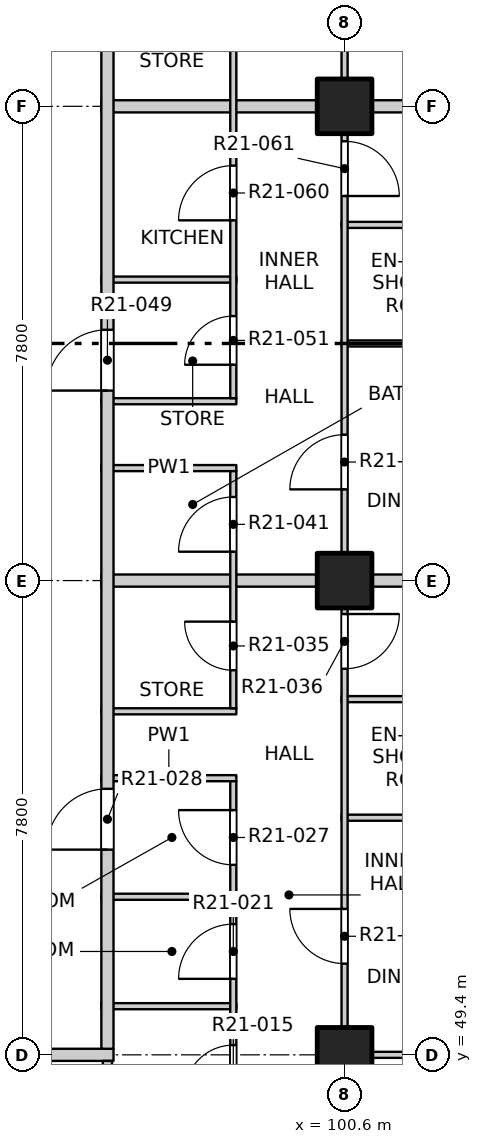
"""IFC4 building model, lengths in metres.
Left out: names, types, materials, properties, quantities, classifications, styles, units other than length and angle.
Written with IfcOpenShell. Run it as: python <this file> out.ifc"""

import sys

from ifc_helpers import new_model, si_unit, direction, frame, frame_2d, origin, origin_2d, place, context, subcontext, project, spatial, rectangle, extrude, element, fill, save


model = new_model("IFC4")
c1 = context("Model", 3, precision=1e-05, world=origin(), true_north=direction((0.0, 1.0)))
c2 = subcontext(c1, "Body", "Model", "MODEL_VIEW")
j1 = project(units=[si_unit("LENGTHUNIT", "METRE"), si_unit("PLANEANGLEUNIT", "RADIAN")], contexts=[c1])
p1 = place(None, origin())
s1 = spatial("IfcSite", under=j1, at=p1, CompositionType="ELEMENT")
p2 = place(p1, origin())
s2 = spatial("IfcBuilding", under=s1, at=p2, CompositionType="ELEMENT")
p3 = place(p2, frame((0.0, 0.0, 221.1)))
s3 = spatial("IfcBuildingStorey", under=s2, at=p3, CompositionType="ELEMENT", Elevation=221.1)
for number, where, z_axis, x_axis in (
    (1, (100.6, 49.4, -0.25), (0.0, 0.0, 1.0), (1.0, 0.0, 0.0)),
    (2, (100.6, 57.2, -0.25), (0.0, 0.0, 1.0), (1.0, 0.0, 0.0)),
    (3, (100.6, 65.0, -0.25), (0.0, 0.0, 1.0), (1.0, 0.0, 0.0)),
):
    element("IfcColumn", number, at=place(p3, frame(where, z_axis=z_axis, x_axis=x_axis)), inside=s3, PredefinedType="COLUMN", context=c2, shape_type="SweptSolid", body=[
        extrude(rectangle(XDim=0.9, YDim=0.9, at=origin_2d()), origin(), (0.0, 0.0, 1.0), 3.4),
    ])
p4 = place(p3, frame((73.2, 49.4, 0.0), z_axis=(0.0, 0.0, 1.0), x_axis=(1.0, 0.0, 0.0)))
e4 = element("IfcWall", 4, at=p4, inside=s3, PredefinedType="PARTITIONING", context=c2, shape_type="SweptSolid", body=[
    extrude(rectangle(XDim=23.6, YDim=0.2, at=frame_2d((11.8, 0.0))), origin(), (0.0, 0.0, 1.0), 3.15),
])
p5 = place(p4, frame((1.6, 0.0, 0.0)))
e5 = element("IfcOpeningElement", 5, at=p5, cuts=e4, PredefinedType="OPENING", context=c2, shape_type="SweptSolid", body=[
    extrude(rectangle(XDim=0.9, YDim=2.1, at=frame_2d((0.45, 1.05))), frame((0.0, 0.11, 0.0), z_axis=(0.0, -1.0, 0.0), x_axis=(1.0, 0.0, 0.0)), (0.0, 0.0, 1.0), 0.22),
])
p6 = place(p4, frame((7.3, 0.0, 0.0)))
e6 = element("IfcOpeningElement", 6, at=p6, cuts=e4, PredefinedType="OPENING", context=c2, shape_type="SweptSolid", body=[
    extrude(rectangle(XDim=1.2, YDim=2.1, at=frame_2d((0.6, 1.05))), frame((0.0, 0.11, 0.0), z_axis=(0.0, -1.0, 0.0), x_axis=(1.0, 0.0, 0.0)), (0.0, 0.0, 1.0), 0.22),
])
p7 = place(p4, frame((13.3, 0.0, 0.0)))
e7 = element("IfcOpeningElement", 7, at=p7, cuts=e4, PredefinedType="OPENING", context=c2, shape_type="SweptSolid", body=[
    extrude(rectangle(XDim=0.9, YDim=2.1, at=frame_2d((0.45, 1.05))), frame((0.0, 0.11, 0.0), z_axis=(0.0, -1.0, 0.0), x_axis=(1.0, 0.0, 0.0)), (0.0, 0.0, 1.0), 0.22),
])
p8 = place(p4, frame((20.175, 0.0, 0.0)))
e8 = element("IfcOpeningElement", 8, at=p8, cuts=e4, PredefinedType="OPENING", context=c2, shape_type="SweptSolid", body=[
    extrude(rectangle(XDim=1.2, YDim=2.1, at=frame_2d((0.6, 1.05))), frame((0.0, 0.11, 0.0), z_axis=(0.0, -1.0, 0.0), x_axis=(1.0, 0.0, 0.0)), (0.0, 0.0, 1.0), 0.22),
])
p9 = place(p3, frame((100.55, 49.4, 0.0), z_axis=(0.0, 0.0, 1.0), x_axis=(1.0, 0.0, 0.0)))
e9 = element("IfcWall", 9, at=p9, inside=s3, PredefinedType="PARTITIONING", context=c2, shape_type="SweptSolid", body=[
    extrude(rectangle(XDim=7.55, YDim=0.1, at=frame_2d((3.775, 0.0))), origin(), (0.0, 0.0, 1.0), 3.15),
])
for number, where, z_axis, x_axis in (
    (10, (96.6, 50.2, 0.0), (0.0, 0.0, 1.0), (1.0, 0.0, 0.0)),
    (11, (96.6, 52.0, 0.0), (0.0, 0.0, 1.0), (1.0, 0.0, 0.0)),
):
    element("IfcWall", number, at=place(p3, frame(where, z_axis=z_axis, x_axis=x_axis)), inside=s3, PredefinedType="PARTITIONING", context=c2, shape_type="SweptSolid", body=[
        extrude(rectangle(XDim=2.22, YDim=0.1, at=frame_2d((1.11, 0.0))), origin(), (0.0, 0.0, 1.0), 3.15),
    ])
p10 = place(p3, frame((100.55, 53.3, 0.0), z_axis=(0.0, 0.0, 1.0), x_axis=(1.0, 0.0, 0.0)))
e12 = element("IfcWall", 12, at=p10, inside=s3, PredefinedType="PARTITIONING", context=c2, shape_type="SweptSolid", body=[
    extrude(rectangle(XDim=7.55, YDim=0.1, at=frame_2d((3.775, 0.0))), origin(), (0.0, 0.0, 1.0), 3.15),
])
for number, where, z_axis, x_axis in (
    (13, (96.6, 53.95, 0.0), (0.0, 0.0, 1.0), (1.0, 0.0, 0.0)),
    (14, (96.6, 55.05, 0.0), (0.0, 0.0, 1.0), (1.0, 0.0, 0.0)),
):
    element("IfcWall", number, at=place(p3, frame(where, z_axis=z_axis, x_axis=x_axis)), inside=s3, PredefinedType="PARTITIONING", context=c2, shape_type="SweptSolid", body=[
        extrude(rectangle(XDim=2.22, YDim=0.1, at=frame_2d((1.11, 0.0))), origin(), (0.0, 0.0, 1.0), 3.15),
    ])
p11 = place(p3, frame((100.55, 55.25, 0.0), z_axis=(0.0, 0.0, 1.0), x_axis=(1.0, 0.0, 0.0)))
e15 = element("IfcWall", 15, at=p11, inside=s3, PredefinedType="PARTITIONING", context=c2, shape_type="SweptSolid", body=[
    extrude(rectangle(XDim=3.7, YDim=0.1, at=frame_2d((1.85, 0.0))), origin(), (0.0, 0.0, 1.0), 3.15),
])
p12 = place(p3, frame((96.6, 57.2, 0.0), z_axis=(0.0, 0.0, 1.0), x_axis=(1.0, 0.0, 0.0)))
e16 = element("IfcWall", 16, at=p12, inside=s3, PredefinedType="PARTITIONING", context=c2, shape_type="SweptSolid", body=[
    extrude(rectangle(XDim=11.5, YDim=0.2, at=frame_2d((5.75, 0.0))), origin(), (0.0, 0.0, 1.0), 3.15),
])
for number, where, z_axis, x_axis in (
    (17, (96.6, 59.05, 0.0), (0.0, 0.0, 1.0), (1.0, 0.0, 0.0)),
    (18, (96.6, 60.15, 0.0), (0.0, 0.0, 1.0), (1.0, 0.0, 0.0)),
):
    element("IfcWall", number, at=place(p3, frame(where, z_axis=z_axis, x_axis=x_axis)), inside=s3, PredefinedType="PARTITIONING", context=c2, shape_type="SweptSolid", body=[
        extrude(rectangle(XDim=2.22, YDim=0.1, at=frame_2d((1.11, 0.0))), origin(), (0.0, 0.0, 1.0), 3.15),
    ])
p13 = place(p3, frame((100.55, 61.1, 0.0), z_axis=(0.0, 0.0, 1.0), x_axis=(1.0, 0.0, 0.0)))
e19 = element("IfcWall", 19, at=p13, inside=s3, PredefinedType="PARTITIONING", context=c2, shape_type="SweptSolid", body=[
    extrude(rectangle(XDim=7.55, YDim=0.1, at=frame_2d((3.775, 0.0))), origin(), (0.0, 0.0, 1.0), 2.55),
])
p14 = place(p3, frame((96.6, 62.15, 0.0), z_axis=(0.0, 0.0, 1.0), x_axis=(1.0, 0.0, 0.0)))
e20 = element("IfcWall", 20, at=p14, inside=s3, PredefinedType="PARTITIONING", context=c2, shape_type="SweptSolid", body=[
    extrude(rectangle(XDim=2.22, YDim=0.1, at=frame_2d((1.11, 0.0))), origin(), (0.0, 0.0, 1.0), 3.15),
])
p15 = place(p3, frame((100.55, 63.05, 0.0), z_axis=(0.0, 0.0, 1.0), x_axis=(1.0, 0.0, 0.0)))
e21 = element("IfcWall", 21, at=p15, inside=s3, PredefinedType="PARTITIONING", context=c2, shape_type="SweptSolid", body=[
    extrude(rectangle(XDim=3.7, YDim=0.1, at=frame_2d((1.85, 0.0))), origin(), (0.0, 0.0, 1.0), 3.15),
])
p16 = place(p3, frame((96.6, 65.0, 0.0), z_axis=(0.0, 0.0, 1.0), x_axis=(1.0, 0.0, 0.0)))
e22 = element("IfcWall", 22, at=p16, inside=s3, PredefinedType="PARTITIONING", context=c2, shape_type="SweptSolid", body=[
    extrude(rectangle(XDim=11.5, YDim=0.2, at=frame_2d((5.75, 0.0))), origin(), (0.0, 0.0, 1.0), 3.15),
])
p17 = place(p3, frame((96.7, 41.9, 0.0), z_axis=(0.0, 0.0, 1.0), x_axis=(0.0, 1.0, 0.0)))
e23 = element("IfcWall", 23, at=p17, inside=s3, PredefinedType="PARTITIONING", context=c2, shape_type="SweptSolid", body=[
    extrude(rectangle(XDim=7.4, YDim=0.15, at=frame_2d((3.7, 0.0))), origin(), (0.0, 0.0, 1.0), 3.15),
])
p18 = place(p3, frame((96.7, 49.5, 0.0), z_axis=(0.0, 0.0, 1.0), x_axis=(0.0, 1.0, 0.0)))
e24 = element("IfcWall", 24, at=p18, inside=s3, PredefinedType="PARTITIONING", context=c2, shape_type="SweptSolid", body=[
    extrude(rectangle(XDim=34.9, YDim=0.2, at=frame_2d((17.45, 0.0))), origin(), (0.0, 0.0, 1.0), 3.15),
])
p19 = place(p18, frame((3.275, 0.0, 0.0)))
e25 = element("IfcOpeningElement", 25, at=p19, cuts=e24, PredefinedType="OPENING", context=c2, shape_type="SweptSolid", body=[
    extrude(rectangle(XDim=1.0, YDim=2.1, at=frame_2d((0.5, 1.05))), frame((0.0, 0.11, 0.0), z_axis=(0.0, -1.0, 0.0), x_axis=(1.0, 0.0, 0.0)), (0.0, 0.0, 1.0), 0.22),
])
p20 = place(p18, frame((10.825, 0.0, 0.0)))
e26 = element("IfcOpeningElement", 26, at=p20, cuts=e24, PredefinedType="OPENING", context=c2, shape_type="SweptSolid", body=[
    extrude(rectangle(XDim=1.0, YDim=2.1, at=frame_2d((0.5, 1.05))), frame((0.0, 0.11, 0.0), z_axis=(0.0, -1.0, 0.0), x_axis=(1.0, 0.0, 0.0)), (0.0, 0.0, 1.0), 0.22),
])
p21 = place(p18, frame((21.575, 0.0, 0.0)))
e27 = element("IfcOpeningElement", 27, at=p21, cuts=e24, PredefinedType="OPENING", context=c2, shape_type="SweptSolid", body=[
    extrude(rectangle(XDim=1.0, YDim=2.1, at=frame_2d((0.5, 1.05))), frame((0.0, 0.11, 0.0), z_axis=(0.0, -1.0, 0.0), x_axis=(1.0, 0.0, 0.0)), (0.0, 0.0, 1.0), 0.22),
])
p22 = place(p18, frame((30.575, 0.0, 0.0)))
e28 = element("IfcOpeningElement", 28, at=p22, cuts=e24, PredefinedType="OPENING", context=c2, shape_type="SweptSolid", body=[
    extrude(rectangle(XDim=1.0, YDim=2.1, at=frame_2d((0.5, 1.05))), frame((0.0, 0.11, 0.0), z_axis=(0.0, -1.0, 0.0), x_axis=(1.0, 0.0, 0.0)), (0.0, 0.0, 1.0), 0.22),
])
p23 = place(p3, frame((98.77, 45.55, 0.0), z_axis=(0.0, 0.0, 1.0), x_axis=(0.0, 1.0, 0.0)))
e29 = element("IfcWall", 29, at=p23, inside=s3, PredefinedType="PARTITIONING", context=c2, shape_type="SweptSolid", body=[
    extrude(rectangle(XDim=8.35, YDim=0.1, at=frame_2d((4.175, 0.0))), origin(), (0.0, 0.0, 1.0), 3.15),
])
p24 = place(p23, frame((0.81, 0.0, 0.0)))
e30 = element("IfcOpeningElement", 30, at=p24, cuts=e29, PredefinedType="OPENING", context=c2, shape_type="SweptSolid", body=[
    extrude(rectangle(XDim=0.9, YDim=2.1, at=frame_2d((0.45, 1.05))), frame((0.0, 0.06, 0.0), z_axis=(0.0, -1.0, 0.0), x_axis=(1.0, 0.0, 0.0)), (0.0, 0.0, 1.0), 0.12),
])
p25 = place(p23, frame((3.21, 0.0, 0.0)))
e31 = element("IfcOpeningElement", 31, at=p25, cuts=e29, PredefinedType="OPENING", context=c2, shape_type="SweptSolid", body=[
    extrude(rectangle(XDim=0.8, YDim=2.1, at=frame_2d((0.4, 1.05))), frame((0.0, 0.06, 0.0), z_axis=(0.0, -1.0, 0.0), x_axis=(1.0, 0.0, 0.0)), (0.0, 0.0, 1.0), 0.12),
])
p26 = place(p23, frame((5.1, 0.0, 0.0)))
e32 = element("IfcOpeningElement", 32, at=p26, cuts=e29, PredefinedType="OPENING", context=c2, shape_type="SweptSolid", body=[
    extrude(rectangle(XDim=0.9, YDim=2.1, at=frame_2d((0.45, 1.05))), frame((0.0, 0.06, 0.0), z_axis=(0.0, -1.0, 0.0), x_axis=(1.0, 0.0, 0.0)), (0.0, 0.0, 1.0), 0.12),
])
p27 = place(p23, frame((6.975, 0.0, 0.0)))
e33 = element("IfcOpeningElement", 33, at=p27, cuts=e29, PredefinedType="OPENING", context=c2, shape_type="SweptSolid", body=[
    extrude(rectangle(XDim=0.9, YDim=2.1, at=frame_2d((0.45, 1.05))), frame((0.0, 0.06, 0.0), z_axis=(0.0, -1.0, 0.0), x_axis=(1.0, 0.0, 0.0)), (0.0, 0.0, 1.0), 0.12),
])
p28 = place(p3, frame((98.77, 55.1, 0.0), z_axis=(0.0, 0.0, 1.0), x_axis=(0.0, 1.0, 0.0)))
e34 = element("IfcWall", 34, at=p28, inside=s3, PredefinedType="PARTITIONING", context=c2, shape_type="SweptSolid", body=[
    extrude(rectangle(XDim=3.9, YDim=0.1, at=frame_2d((1.95, 0.0))), origin(), (0.0, 0.0, 1.0), 3.15),
])
p29 = place(p28, frame((0.625, 0.0, 0.0)))
e35 = element("IfcOpeningElement", 35, at=p29, cuts=e34, PredefinedType="OPENING", context=c2, shape_type="SweptSolid", body=[
    extrude(rectangle(XDim=0.8, YDim=2.1, at=frame_2d((0.4, 1.05))), frame((0.0, 0.06, 0.0), z_axis=(0.0, -1.0, 0.0), x_axis=(1.0, 0.0, 0.0)), (0.0, 0.0, 1.0), 0.12),
])
p30 = place(p28, frame((2.575, 0.0, 0.0)))
e36 = element("IfcOpeningElement", 36, at=p30, cuts=e34, PredefinedType="OPENING", context=c2, shape_type="SweptSolid", body=[
    extrude(rectangle(XDim=0.9, YDim=2.1, at=frame_2d((0.45, 1.05))), frame((0.0, 0.06, 0.0), z_axis=(0.0, -1.0, 0.0), x_axis=(1.0, 0.0, 0.0)), (0.0, 0.0, 1.0), 0.12),
])
p31 = place(p3, frame((98.77, 60.2, 0.0), z_axis=(0.0, 0.0, 1.0), x_axis=(0.0, 1.0, 0.0)))
e37 = element("IfcWall", 37, at=p31, inside=s3, PredefinedType="PARTITIONING", context=c2, shape_type="SweptSolid", body=[
    extrude(rectangle(XDim=9.55, YDim=0.1, at=frame_2d((4.775, 0.0))), origin(), (0.0, 0.0, 1.0), 3.15),
])
p32 = place(p31, frame((0.55, 0.0, 0.0)))
e38 = element("IfcOpeningElement", 38, at=p32, cuts=e37, PredefinedType="OPENING", context=c2, shape_type="SweptSolid", body=[
    extrude(rectangle(XDim=0.8, YDim=2.1, at=frame_2d((0.4, 1.05))), frame((0.0, 0.06, 0.0), z_axis=(0.0, -1.0, 0.0), x_axis=(1.0, 0.0, 0.0)), (0.0, 0.0, 1.0), 0.12),
])
p33 = place(p31, frame((2.925, 0.0, 0.0)))
e39 = element("IfcOpeningElement", 39, at=p33, cuts=e37, PredefinedType="OPENING", context=c2, shape_type="SweptSolid", body=[
    extrude(rectangle(XDim=0.9, YDim=2.1, at=frame_2d((0.45, 1.05))), frame((0.0, 0.06, 0.0), z_axis=(0.0, -1.0, 0.0), x_axis=(1.0, 0.0, 0.0)), (0.0, 0.0, 1.0), 0.12),
])
p34 = place(p31, frame((5.85, 0.0, 0.0)))
e40 = element("IfcOpeningElement", 40, at=p34, cuts=e37, PredefinedType="OPENING", context=c2, shape_type="SweptSolid", body=[
    extrude(rectangle(XDim=0.8, YDim=2.1, at=frame_2d((0.4, 1.05))), frame((0.0, 0.06, 0.0), z_axis=(0.0, -1.0, 0.0), x_axis=(1.0, 0.0, 0.0)), (0.0, 0.0, 1.0), 0.12),
])
p35 = place(p31, frame((8.2, 0.0, 0.0)))
e41 = element("IfcOpeningElement", 41, at=p35, cuts=e37, PredefinedType="OPENING", context=c2, shape_type="SweptSolid", body=[
    extrude(rectangle(XDim=0.9, YDim=2.1, at=frame_2d((0.45, 1.05))), frame((0.0, 0.06, 0.0), z_axis=(0.0, -1.0, 0.0), x_axis=(1.0, 0.0, 0.0)), (0.0, 0.0, 1.0), 0.12),
])
p36 = place(p3, frame((100.6, 41.9, 0.0), z_axis=(0.0, 0.0, 1.0), x_axis=(0.0, 1.0, 0.0)))
e42 = element("IfcWall", 42, at=p36, inside=s3, PredefinedType="PARTITIONING", context=c2, shape_type="SweptSolid", body=[
    extrude(rectangle(XDim=46.2, YDim=0.1, at=frame_2d((23.1, 0.0))), origin(), (0.0, 0.0, 1.0), 3.15),
])
p37 = place(p36, frame((1.2, 0.0, 0.0)))
e43 = element("IfcOpeningElement", 43, at=p37, cuts=e42, PredefinedType="OPENING", context=c2, shape_type="SweptSolid", body=[
    extrude(rectangle(XDim=0.9, YDim=2.1, at=frame_2d((0.45, 1.05))), frame((0.0, 0.06, 0.0), z_axis=(0.0, -1.0, 0.0), x_axis=(1.0, 0.0, 0.0)), (0.0, 0.0, 1.0), 0.12),
])
p38 = place(p36, frame((6.025, 0.0, 0.0)))
e44 = element("IfcOpeningElement", 44, at=p38, cuts=e42, PredefinedType="OPENING", context=c2, shape_type="SweptSolid", body=[
    extrude(rectangle(XDim=0.9, YDim=2.1, at=frame_2d((0.45, 1.05))), frame((0.0, 0.06, 0.0), z_axis=(0.0, -1.0, 0.0), x_axis=(1.0, 0.0, 0.0)), (0.0, 0.0, 1.0), 0.12),
])
p39 = place(p36, frame((9.0, 0.0, 0.0)))
e45 = element("IfcOpeningElement", 45, at=p39, cuts=e42, PredefinedType="OPENING", context=c2, shape_type="SweptSolid", body=[
    extrude(rectangle(XDim=0.9, YDim=2.1, at=frame_2d((0.45, 1.05))), frame((0.0, 0.06, 0.0), z_axis=(0.0, -1.0, 0.0), x_axis=(1.0, 0.0, 0.0)), (0.0, 0.0, 1.0), 0.12),
])
p40 = place(p36, frame((13.85, 0.0, 0.0)))
e46 = element("IfcOpeningElement", 46, at=p40, cuts=e42, PredefinedType="OPENING", context=c2, shape_type="SweptSolid", body=[
    extrude(rectangle(XDim=0.9, YDim=2.1, at=frame_2d((0.45, 1.05))), frame((0.0, 0.06, 0.0), z_axis=(0.0, -1.0, 0.0), x_axis=(1.0, 0.0, 0.0)), (0.0, 0.0, 1.0), 0.12),
])
p41 = place(p36, frame((16.8, 0.0, 0.0)))
e47 = element("IfcOpeningElement", 47, at=p41, cuts=e42, PredefinedType="OPENING", context=c2, shape_type="SweptSolid", body=[
    extrude(rectangle(XDim=0.9, YDim=2.1, at=frame_2d((0.45, 1.05))), frame((0.0, 0.06, 0.0), z_axis=(0.0, -1.0, 0.0), x_axis=(1.0, 0.0, 0.0)), (0.0, 0.0, 1.0), 0.12),
])
p42 = place(p36, frame((21.625, 0.0, 0.0)))
e48 = element("IfcOpeningElement", 48, at=p42, cuts=e42, PredefinedType="OPENING", context=c2, shape_type="SweptSolid", body=[
    extrude(rectangle(XDim=0.9, YDim=2.1, at=frame_2d((0.45, 1.05))), frame((0.0, 0.06, 0.0), z_axis=(0.0, -1.0, 0.0), x_axis=(1.0, 0.0, 0.0)), (0.0, 0.0, 1.0), 0.12),
])
p43 = place(p36, frame((24.6, 0.0, 0.0)))
e49 = element("IfcOpeningElement", 49, at=p43, cuts=e42, PredefinedType="OPENING", context=c2, shape_type="SweptSolid", body=[
    extrude(rectangle(XDim=0.9, YDim=2.1, at=frame_2d((0.45, 1.05))), frame((0.0, 0.06, 0.0), z_axis=(0.0, -1.0, 0.0), x_axis=(1.0, 0.0, 0.0)), (0.0, 0.0, 1.0), 0.12),
])
p44 = place(p36, frame((29.425, 0.0, 0.0)))
e50 = element("IfcOpeningElement", 50, at=p44, cuts=e42, PredefinedType="OPENING", context=c2, shape_type="SweptSolid", body=[
    extrude(rectangle(XDim=0.9, YDim=2.1, at=frame_2d((0.45, 1.05))), frame((0.0, 0.06, 0.0), z_axis=(0.0, -1.0, 0.0), x_axis=(1.0, 0.0, 0.0)), (0.0, 0.0, 1.0), 0.12),
])
p45 = place(p36, frame((33.375, 0.0, 0.0)))
e51 = element("IfcOpeningElement", 51, at=p45, cuts=e42, PredefinedType="OPENING", context=c2, shape_type="SweptSolid", body=[
    extrude(rectangle(XDim=0.9, YDim=2.1, at=frame_2d((0.45, 1.05))), frame((0.0, 0.06, 0.0), z_axis=(0.0, -1.0, 0.0), x_axis=(1.0, 0.0, 0.0)), (0.0, 0.0, 1.0), 0.12),
])
p46 = place(p36, frame((36.3, 0.0, 0.0)))
e52 = element("IfcOpeningElement", 52, at=p46, cuts=e42, PredefinedType="OPENING", context=c2, shape_type="SweptSolid", body=[
    extrude(rectangle(XDim=0.9, YDim=2.1, at=frame_2d((0.45, 1.05))), frame((0.0, 0.06, 0.0), z_axis=(0.0, -1.0, 0.0), x_axis=(1.0, 0.0, 0.0)), (0.0, 0.0, 1.0), 0.12),
])
p47 = place(p36, frame((41.175, 0.0, 0.0)))
e53 = element("IfcOpeningElement", 53, at=p47, cuts=e42, PredefinedType="OPENING", context=c2, shape_type="SweptSolid", body=[
    extrude(rectangle(XDim=0.9, YDim=2.1, at=frame_2d((0.45, 1.05))), frame((0.0, 0.06, 0.0), z_axis=(0.0, -1.0, 0.0), x_axis=(1.0, 0.0, 0.0)), (0.0, 0.0, 1.0), 0.12),
])
p48 = place(p36, frame((44.1, 0.0, 0.0)))
e54 = element("IfcOpeningElement", 54, at=p48, cuts=e42, PredefinedType="OPENING", context=c2, shape_type="SweptSolid", body=[
    extrude(rectangle(XDim=0.9, YDim=2.1, at=frame_2d((0.45, 1.05))), frame((0.0, 0.06, 0.0), z_axis=(0.0, -1.0, 0.0), x_axis=(1.0, 0.0, 0.0)), (0.0, 0.0, 1.0), 0.12),
])
p49 = place(p25, origin())
e55 = element("IfcDoor", 55, at=p49, inside=s3, OperationType="SINGLE_SWING_LEFT", PredefinedType="DOOR", context=c2, shape_type="SweptSolid", body=[
    extrude(rectangle(XDim=0.8, YDim=2.1, at=frame_2d((0.4, 1.05))), frame((0.0, 0.025, 0.0), z_axis=(0.0, -1.0, 0.0), x_axis=(1.0, 0.0, 0.0)), (0.0, 0.0, 1.0), 0.05),
])
fill(e31, e55)
p50 = place(p26, origin())
e56 = element("IfcDoor", 56, at=p50, inside=s3, OperationType="SINGLE_SWING_LEFT", PredefinedType="DOOR", context=c2, shape_type="SweptSolid", body=[
    extrude(rectangle(XDim=0.9, YDim=2.1, at=frame_2d((0.45, 1.05))), frame((0.0, 0.025, 0.0), z_axis=(0.0, -1.0, 0.0), x_axis=(1.0, 0.0, 0.0)), (0.0, 0.0, 1.0), 0.05),
])
fill(e32, e56)
p51 = place(p39, origin())
e57 = element("IfcDoor", 57, at=p51, inside=s3, OperationType="SINGLE_SWING_RIGHT", PredefinedType="DOOR", context=c2, shape_type="SweptSolid", body=[
    extrude(rectangle(XDim=0.9, YDim=2.1, at=frame_2d((0.45, 1.05))), frame((0.0, 0.025, 0.0), z_axis=(0.0, -1.0, 0.0), x_axis=(1.0, 0.0, 0.0)), (0.0, 0.0, 1.0), 0.05),
])
fill(e45, e57)
p52 = place(p27, origin())
e58 = element("IfcDoor", 58, at=p52, inside=s3, OperationType="SINGLE_SWING_RIGHT", PredefinedType="DOOR", context=c2, shape_type="SweptSolid", body=[
    extrude(rectangle(XDim=0.9, YDim=2.1, at=frame_2d((0.45, 1.05))), frame((0.0, 0.025, 0.0), z_axis=(0.0, -1.0, 0.0), x_axis=(1.0, 0.0, 0.0)), (0.0, 0.0, 1.0), 0.05),
])
fill(e33, e58)
p53 = place(p19, origin())
e59 = element("IfcDoor", 59, at=p53, inside=s3, OperationType="SINGLE_SWING_RIGHT", PredefinedType="DOOR", context=c2, shape_type="SweptSolid", body=[
    extrude(rectangle(XDim=1.0, YDim=2.1, at=frame_2d((0.5, 1.05))), frame((0.0, 0.025, 0.0), z_axis=(0.0, -1.0, 0.0), x_axis=(1.0, 0.0, 0.0)), (0.0, 0.0, 1.0), 0.05),
])
fill(e25, e59)
p54 = place(p29, origin())
e60 = element("IfcDoor", 60, at=p54, inside=s3, OperationType="SINGLE_SWING_RIGHT", PredefinedType="DOOR", context=c2, shape_type="SweptSolid", body=[
    extrude(rectangle(XDim=0.8, YDim=2.1, at=frame_2d((0.4, 1.05))), frame((0.0, 0.025, 0.0), z_axis=(0.0, -1.0, 0.0), x_axis=(1.0, 0.0, 0.0)), (0.0, 0.0, 1.0), 0.05),
])
fill(e35, e60)
p55 = place(p40, origin())
e61 = element("IfcDoor", 61, at=p55, inside=s3, OperationType="SINGLE_SWING_LEFT", PredefinedType="DOOR", context=c2, shape_type="SweptSolid", body=[
    extrude(rectangle(XDim=0.9, YDim=2.1, at=frame_2d((0.45, 1.05))), frame((0.0, 0.025, 0.0), z_axis=(0.0, -1.0, 0.0), x_axis=(1.0, 0.0, 0.0)), (0.0, 0.0, 1.0), 0.05),
])
fill(e46, e61)
p56 = place(p30, origin())
e62 = element("IfcDoor", 62, at=p56, inside=s3, OperationType="SINGLE_SWING_LEFT", PredefinedType="DOOR", context=c2, shape_type="SweptSolid", body=[
    extrude(rectangle(XDim=0.9, YDim=2.1, at=frame_2d((0.45, 1.05))), frame((0.0, 0.025, 0.0), z_axis=(0.0, -1.0, 0.0), x_axis=(1.0, 0.0, 0.0)), (0.0, 0.0, 1.0), 0.05),
])
fill(e36, e62)
p57 = place(p41, origin())
e63 = element("IfcDoor", 63, at=p57, inside=s3, OperationType="SINGLE_SWING_LEFT", PredefinedType="DOOR", context=c2, shape_type="SweptSolid", body=[
    extrude(rectangle(XDim=0.9, YDim=2.1, at=frame_2d((0.45, 1.05))), frame((0.0, 0.025, 0.0), z_axis=(0.0, -1.0, 0.0), x_axis=(1.0, 0.0, 0.0)), (0.0, 0.0, 1.0), 0.05),
])
fill(e47, e63)
p58 = place(p20, origin())
e64 = element("IfcDoor", 64, at=p58, inside=s3, OperationType="SINGLE_SWING_LEFT", PredefinedType="DOOR", context=c2, shape_type="SweptSolid", body=[
    extrude(rectangle(XDim=1.0, YDim=2.1, at=frame_2d((0.5, 1.05))), frame((0.0, 0.025, 0.0), z_axis=(0.0, -1.0, 0.0), x_axis=(1.0, 0.0, 0.0)), (0.0, 0.0, 1.0), 0.05),
])
fill(e26, e64)
p59 = place(p32, origin())
e65 = element("IfcDoor", 65, at=p59, inside=s3, OperationType="SINGLE_SWING_LEFT", PredefinedType="DOOR", context=c2, shape_type="SweptSolid", body=[
    extrude(rectangle(XDim=0.8, YDim=2.1, at=frame_2d((0.4, 1.05))), frame((0.0, 0.025, 0.0), z_axis=(0.0, -1.0, 0.0), x_axis=(1.0, 0.0, 0.0)), (0.0, 0.0, 1.0), 0.05),
])
fill(e38, e65)
p60 = place(p33, origin())
e66 = element("IfcDoor", 66, at=p60, inside=s3, OperationType="SINGLE_SWING_LEFT", PredefinedType="DOOR", context=c2, shape_type="SweptSolid", body=[
    extrude(rectangle(XDim=0.9, YDim=2.1, at=frame_2d((0.45, 1.05))), frame((0.0, 0.025, 0.0), z_axis=(0.0, -1.0, 0.0), x_axis=(1.0, 0.0, 0.0)), (0.0, 0.0, 1.0), 0.05),
])
fill(e39, e66)
p61 = place(p42, origin())
e67 = element("IfcDoor", 67, at=p61, inside=s3, OperationType="SINGLE_SWING_RIGHT", PredefinedType="DOOR", context=c2, shape_type="SweptSolid", body=[
    extrude(rectangle(XDim=0.9, YDim=2.1, at=frame_2d((0.45, 1.05))), frame((0.0, 0.025, 0.0), z_axis=(0.0, -1.0, 0.0), x_axis=(1.0, 0.0, 0.0)), (0.0, 0.0, 1.0), 0.05),
])
fill(e48, e67)
save(model, sys.argv[1])
